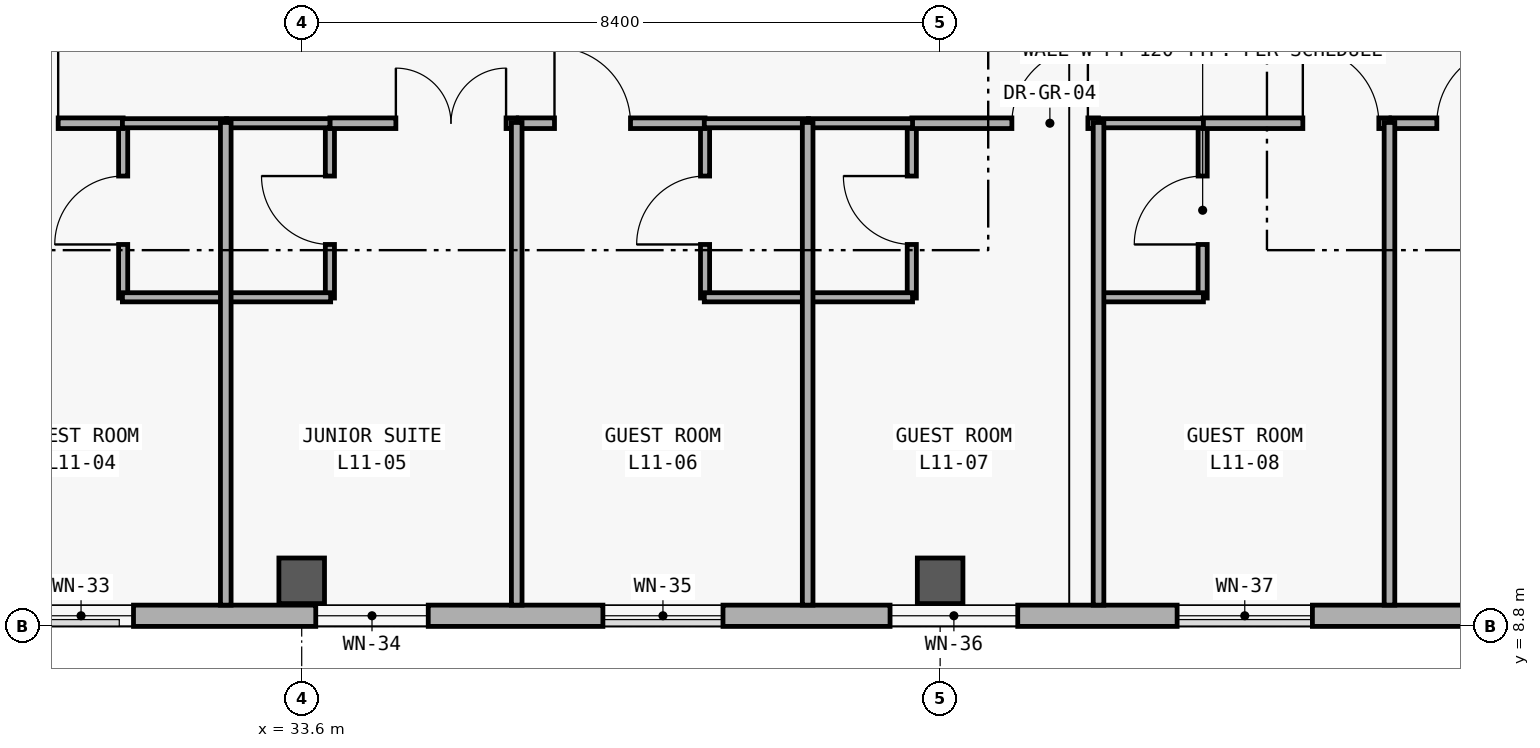
"""IFC4 building model, lengths in metres.
Left out: names, types, materials, properties, quantities, classifications, styles, units other than length and angle.
Written with IfcOpenShell. Run it as: python <this file> out.ifc"""

import sys

from ifc_helpers import new_model, si_unit, direction, frame, frame_2d, origin, origin_2d, place, context, subcontext, project, spatial, rectangle, extrude, element, fill, save


model = new_model("IFC4")
c1 = context("Model", 3, precision=1e-05, world=origin(), true_north=direction((0.0, 1.0)))
c2 = subcontext(c1, "Body", "Model", "MODEL_VIEW")
j1 = project(units=[si_unit("LENGTHUNIT", "METRE"), si_unit("PLANEANGLEUNIT", "RADIAN")], contexts=[c1])
p1 = place(None, origin())
s1 = spatial("IfcSite", under=j1, at=p1, CompositionType="ELEMENT")
p2 = place(p1, origin())
s2 = spatial("IfcBuilding", under=s1, at=p2, CompositionType="ELEMENT")
p3 = place(p2, frame((0.0, 0.0, 44.4)))
s3 = spatial("IfcBuildingStorey", under=s2, at=p3, CompositionType="ELEMENT", Elevation=44.4)
for number, where, z_axis, x_axis in (
    (1, (33.6, 9.4, 0.0), (0.0, 0.0, 1.0), (1.0, 0.0, 0.0)),
    (2, (42.0, 9.4, 0.0), (0.0, 0.0, 1.0), (1.0, 0.0, 0.0)),
):
    element("IfcColumn", number, at=place(p3, frame(where, z_axis=z_axis, x_axis=x_axis)), inside=s3, PredefinedType="COLUMN", context=c2, shape_type="SweptSolid", body=[
        extrude(rectangle(XDim=0.6, YDim=0.6, at=origin_2d()), origin(), (0.0, 0.0, 1.0), 4.2),
    ])
p4 = place(p3, frame((66.92, 8.94, 0.0), z_axis=(0.0, 0.0, 1.0), x_axis=(-1.0, 0.0, 0.0)))
e3 = element("IfcWall", 3, at=p4, inside=s3, PredefinedType="SOLIDWALL", context=c2, shape_type="SweptSolid", body=[
    extrude(rectangle(XDim=49.84, YDim=0.28, at=frame_2d((24.92, 0.0))), origin(), (0.0, 0.0, 1.0), 3.96),
])
p5 = place(p4, frame((6.82, 0.0, 0.85)))
e4 = element("IfcOpeningElement", 4, at=p5, cuts=e3, PredefinedType="OPENING", context=c2, shape_type="SweptSolid", body=[
    extrude(rectangle(XDim=1.5, YDim=1.75, at=frame_2d((0.75, 0.875))), frame((0.0, 0.15, 0.0), z_axis=(0.0, -1.0, 0.0), x_axis=(1.0, 0.0, 0.0)), (0.0, 0.0, 1.0), 0.3),
])
p6 = place(p4, frame((46.331, 0.0, 0.85)))
e5 = element("IfcOpeningElement", 5, at=p6, cuts=e3, PredefinedType="OPENING", context=c2, shape_type="SweptSolid", body=[
    extrude(rectangle(XDim=2.75, YDim=2.1, at=frame_2d((1.375, 1.05))), frame((0.0, 0.15, 0.0), z_axis=(0.0, -1.0, 0.0), x_axis=(1.0, 0.0, 0.0)), (0.0, 0.0, 1.0), 0.3),
])
p7 = place(p4, frame((43.288, 0.0, 0.85)))
e6 = element("IfcOpeningElement", 6, at=p7, cuts=e3, PredefinedType="OPENING", context=c2, shape_type="SweptSolid", body=[
    extrude(rectangle(XDim=1.18, YDim=1.5, at=frame_2d((0.59, 0.75))), frame((0.0, 0.15, 0.0), z_axis=(0.0, -1.0, 0.0), x_axis=(1.0, 0.0, 0.0)), (0.0, 0.0, 1.0), 0.3),
])
p8 = place(p4, frame((39.41, 0.0, 0.85)))
e7 = element("IfcOpeningElement", 7, at=p8, cuts=e3, PredefinedType="OPENING", context=c2, shape_type="SweptSolid", body=[
    extrude(rectangle(XDim=1.28, YDim=1.6, at=frame_2d((0.64, 0.8))), frame((0.0, 0.15, 0.0), z_axis=(0.0, -1.0, 0.0), x_axis=(1.0, 0.0, 0.0)), (0.0, 0.0, 1.0), 0.3),
])
p9 = place(p4, frame((35.533, 0.0, 0.85)))
e8 = element("IfcOpeningElement", 8, at=p9, cuts=e3, PredefinedType="OPENING", context=c2, shape_type="SweptSolid", body=[
    extrude(rectangle(XDim=1.38, YDim=1.7, at=frame_2d((0.69, 0.85))), frame((0.0, 0.15, 0.0), z_axis=(0.0, -1.0, 0.0), x_axis=(1.0, 0.0, 0.0)), (0.0, 0.0, 1.0), 0.3),
])
p10 = place(p4, frame((31.655, 0.0, 0.85)))
e9 = element("IfcOpeningElement", 9, at=p10, cuts=e3, PredefinedType="OPENING", context=c2, shape_type="SweptSolid", body=[
    extrude(rectangle(XDim=1.48, YDim=1.8, at=frame_2d((0.74, 0.9))), frame((0.0, 0.15, 0.0), z_axis=(0.0, -1.0, 0.0), x_axis=(1.0, 0.0, 0.0)), (0.0, 0.0, 1.0), 0.3),
])
p11 = place(p4, frame((27.777, 0.0, 0.85)))
e10 = element("IfcOpeningElement", 10, at=p11, cuts=e3, PredefinedType="OPENING", context=c2, shape_type="SweptSolid", body=[
    extrude(rectangle(XDim=1.58, YDim=1.85, at=frame_2d((0.79, 0.925))), frame((0.0, 0.15, 0.0), z_axis=(0.0, -1.0, 0.0), x_axis=(1.0, 0.0, 0.0)), (0.0, 0.0, 1.0), 0.3),
])
p12 = place(p4, frame((23.899, 0.0, 0.85)))
e11 = element("IfcOpeningElement", 11, at=p12, cuts=e3, PredefinedType="OPENING", context=c2, shape_type="SweptSolid", body=[
    extrude(rectangle(XDim=1.68, YDim=1.9, at=frame_2d((0.84, 0.95))), frame((0.0, 0.15, 0.0), z_axis=(0.0, -1.0, 0.0), x_axis=(1.0, 0.0, 0.0)), (0.0, 0.0, 1.0), 0.3),
])
p13 = place(p4, frame((20.022, 0.0, 0.85)))
e12 = element("IfcOpeningElement", 12, at=p13, cuts=e3, PredefinedType="OPENING", context=c2, shape_type="SweptSolid", body=[
    extrude(rectangle(XDim=1.78, YDim=1.95, at=frame_2d((0.89, 0.975))), frame((0.0, 0.15, 0.0), z_axis=(0.0, -1.0, 0.0), x_axis=(1.0, 0.0, 0.0)), (0.0, 0.0, 1.0), 0.3),
])
p14 = place(p4, frame((16.144, 0.0, 0.85)))
e13 = element("IfcOpeningElement", 13, at=p14, cuts=e3, PredefinedType="OPENING", context=c2, shape_type="SweptSolid", body=[
    extrude(rectangle(XDim=1.88, YDim=1.95, at=frame_2d((0.94, 0.975))), frame((0.0, 0.15, 0.0), z_axis=(0.0, -1.0, 0.0), x_axis=(1.0, 0.0, 0.0)), (0.0, 0.0, 1.0), 0.3),
])
p15 = place(p3, frame((31.251, 13.12, 0.0), z_axis=(0.0, 0.0, 1.0), x_axis=(0.0, 1.0, 0.0)))
e14 = element("IfcWall", 14, at=p15, inside=s3, PredefinedType="PARTITIONING", context=c2, shape_type="SweptSolid", body=[
    extrude(rectangle(XDim=2.31, YDim=0.12, at=frame_2d((1.155, 0.0))), origin(), (0.0, 0.0, 1.0), 3.06),
])
p16 = place(p15, frame((0.705, 0.0, 0.0)))
e15 = element("IfcOpeningElement", 15, at=p16, cuts=e14, PredefinedType="OPENING", context=c2, shape_type="SweptSolid", body=[
    extrude(rectangle(XDim=0.9, YDim=2.18, at=frame_2d((0.45, 1.09))), frame((0.0, 0.07, 0.0), z_axis=(0.0, -1.0, 0.0), x_axis=(1.0, 0.0, 0.0)), (0.0, 0.0, 1.0), 0.14),
])
p17 = place(p3, frame((33.971, 13.12, 0.0), z_axis=(0.0, 0.0, 1.0), x_axis=(0.0, 1.0, 0.0)))
e16 = element("IfcWall", 16, at=p17, inside=s3, PredefinedType="PARTITIONING", context=c2, shape_type="SweptSolid", body=[
    extrude(rectangle(XDim=2.31, YDim=0.12, at=frame_2d((1.155, 0.0))), origin(), (0.0, 0.0, 1.0), 3.06),
])
p18 = place(p17, frame((0.705, 0.0, 0.0)))
e17 = element("IfcOpeningElement", 17, at=p18, cuts=e16, PredefinedType="OPENING", context=c2, shape_type="SweptSolid", body=[
    extrude(rectangle(XDim=0.9, YDim=2.18, at=frame_2d((0.45, 1.09))), frame((0.0, 0.07, 0.0), z_axis=(0.0, -1.0, 0.0), x_axis=(1.0, 0.0, 0.0)), (0.0, 0.0, 1.0), 0.14),
])
p19 = place(p3, frame((38.907, 13.12, 0.0), z_axis=(0.0, 0.0, 1.0), x_axis=(0.0, 1.0, 0.0)))
e18 = element("IfcWall", 18, at=p19, inside=s3, PredefinedType="PARTITIONING", context=c2, shape_type="SweptSolid", body=[
    extrude(rectangle(XDim=2.31, YDim=0.12, at=frame_2d((1.155, 0.0))), origin(), (0.0, 0.0, 1.0), 3.06),
])
p20 = place(p19, frame((0.705, 0.0, 0.0)))
e19 = element("IfcOpeningElement", 19, at=p20, cuts=e18, PredefinedType="OPENING", context=c2, shape_type="SweptSolid", body=[
    extrude(rectangle(XDim=0.9, YDim=2.18, at=frame_2d((0.45, 1.09))), frame((0.0, 0.07, 0.0), z_axis=(0.0, -1.0, 0.0), x_axis=(1.0, 0.0, 0.0)), (0.0, 0.0, 1.0), 0.14),
])
p21 = place(p3, frame((41.627, 13.12, 0.0), z_axis=(0.0, 0.0, 1.0), x_axis=(0.0, 1.0, 0.0)))
e20 = element("IfcWall", 20, at=p21, inside=s3, PredefinedType="PARTITIONING", context=c2, shape_type="SweptSolid", body=[
    extrude(rectangle(XDim=2.31, YDim=0.12, at=frame_2d((1.155, 0.0))), origin(), (0.0, 0.0, 1.0), 3.06),
])
p22 = place(p21, frame((0.705, 0.0, 0.0)))
e21 = element("IfcOpeningElement", 21, at=p22, cuts=e20, PredefinedType="OPENING", context=c2, shape_type="SweptSolid", body=[
    extrude(rectangle(XDim=0.9, YDim=2.18, at=frame_2d((0.45, 1.09))), frame((0.0, 0.07, 0.0), z_axis=(0.0, -1.0, 0.0), x_axis=(1.0, 0.0, 0.0)), (0.0, 0.0, 1.0), 0.14),
])
p23 = place(p3, frame((45.454, 13.12, 0.0), z_axis=(0.0, 0.0, 1.0), x_axis=(0.0, 1.0, 0.0)))
e22 = element("IfcWall", 22, at=p23, inside=s3, PredefinedType="PARTITIONING", context=c2, shape_type="SweptSolid", body=[
    extrude(rectangle(XDim=2.31, YDim=0.12, at=frame_2d((1.155, 0.0))), origin(), (0.0, 0.0, 1.0), 3.06),
])
p24 = place(p23, frame((0.705, 0.0, 0.0)))
e23 = element("IfcOpeningElement", 23, at=p24, cuts=e22, PredefinedType="OPENING", context=c2, shape_type="SweptSolid", body=[
    extrude(rectangle(XDim=0.9, YDim=2.18, at=frame_2d((0.45, 1.09))), frame((0.0, 0.07, 0.0), z_axis=(0.0, -1.0, 0.0), x_axis=(1.0, 0.0, 0.0)), (0.0, 0.0, 1.0), 0.14),
])
p25 = place(p3, frame((28.793, 15.42, 0.0), z_axis=(0.0, 0.0, 1.0), x_axis=(1.0, 0.0, 0.0)))
e24 = element("IfcWall", 24, at=p25, inside=s3, PredefinedType="PARTITIONING", context=c2, shape_type="SweptSolid", body=[
    extrude(rectangle(XDim=2.458, YDim=0.14, at=frame_2d((1.229, 0.0))), origin(), (0.0, 0.0, 1.0), 3.06),
])
p26 = place(p25, frame((0.603, 0.0, 0.0)))
e25 = element("IfcOpeningElement", 25, at=p26, cuts=e24, PredefinedType="OPENING", context=c2, shape_type="SweptSolid", body=[
    extrude(rectangle(XDim=1.0, YDim=2.28, at=frame_2d((0.5, 1.14))), frame((0.0, 0.08, 0.0), z_axis=(0.0, -1.0, 0.0), x_axis=(1.0, 0.0, 0.0)), (0.0, 0.0, 1.0), 0.16),
])
p27 = place(p3, frame((33.971, 15.42, 0.0), z_axis=(0.0, 0.0, 1.0), x_axis=(1.0, 0.0, 0.0)))
e26 = element("IfcWall", 26, at=p27, inside=s3, PredefinedType="PARTITIONING", context=c2, shape_type="SweptSolid", body=[
    extrude(rectangle(XDim=2.458, YDim=0.14, at=frame_2d((1.229, 0.0))), origin(), (0.0, 0.0, 1.0), 3.06),
])
p28 = place(p27, frame((0.868, 0.0, 0.0)))
e27 = element("IfcOpeningElement", 27, at=p28, cuts=e26, PredefinedType="OPENING", context=c2, shape_type="SweptSolid", body=[
    extrude(rectangle(XDim=1.45, YDim=2.3, at=frame_2d((0.725, 1.15))), frame((0.0, 0.08, 0.0), z_axis=(0.0, -1.0, 0.0), x_axis=(1.0, 0.0, 0.0)), (0.0, 0.0, 1.0), 0.16),
])
p29 = place(p3, frame((36.449, 15.42, 0.0), z_axis=(0.0, 0.0, 1.0), x_axis=(1.0, 0.0, 0.0)))
e28 = element("IfcWall", 28, at=p29, inside=s3, PredefinedType="PARTITIONING", context=c2, shape_type="SweptSolid", body=[
    extrude(rectangle(XDim=2.458, YDim=0.14, at=frame_2d((1.229, 0.0))), origin(), (0.0, 0.0, 1.0), 3.06),
])
p30 = place(p29, frame((0.477, 0.0, 0.0)))
e29 = element("IfcOpeningElement", 29, at=p30, cuts=e28, PredefinedType="OPENING", context=c2, shape_type="SweptSolid", body=[
    extrude(rectangle(XDim=1.0, YDim=2.28, at=frame_2d((0.5, 1.14))), frame((0.0, 0.08, 0.0), z_axis=(0.0, -1.0, 0.0), x_axis=(1.0, 0.0, 0.0)), (0.0, 0.0, 1.0), 0.16),
])
p31 = place(p3, frame((41.627, 15.42, 0.0), z_axis=(0.0, 0.0, 1.0), x_axis=(1.0, 0.0, 0.0)))
e30 = element("IfcWall", 30, at=p31, inside=s3, PredefinedType="PARTITIONING", context=c2, shape_type="SweptSolid", body=[
    extrude(rectangle(XDim=2.457, YDim=0.14, at=frame_2d((1.229, 0.0))), origin(), (0.0, 0.0, 1.0), 3.06),
])
p32 = place(p31, frame((1.317, 0.0, 0.0)))
e31 = element("IfcOpeningElement", 31, at=p32, cuts=e30, PredefinedType="OPENING", context=c2, shape_type="SweptSolid", body=[
    extrude(rectangle(XDim=1.0, YDim=2.28, at=frame_2d((0.5, 1.14))), frame((0.0, 0.08, 0.0), z_axis=(0.0, -1.0, 0.0), x_axis=(1.0, 0.0, 0.0)), (0.0, 0.0, 1.0), 0.16),
])
p33 = place(p3, frame((45.454, 15.42, 0.0), z_axis=(0.0, 0.0, 1.0), x_axis=(1.0, 0.0, 0.0)))
e32 = element("IfcWall", 32, at=p33, inside=s3, PredefinedType="PARTITIONING", context=c2, shape_type="SweptSolid", body=[
    extrude(rectangle(XDim=2.458, YDim=0.14, at=frame_2d((1.229, 0.0))), origin(), (0.0, 0.0, 1.0), 3.06),
])
p34 = place(p33, frame((1.318, 0.0, 0.0)))
e33 = element("IfcOpeningElement", 33, at=p34, cuts=e32, PredefinedType="OPENING", context=c2, shape_type="SweptSolid", body=[
    extrude(rectangle(XDim=1.0, YDim=2.28, at=frame_2d((0.5, 1.14))), frame((0.0, 0.08, 0.0), z_axis=(0.0, -1.0, 0.0), x_axis=(1.0, 0.0, 0.0)), (0.0, 0.0, 1.0), 0.16),
])
p35 = place(p3, frame((47.932, 15.42, 0.0), z_axis=(0.0, 0.0, 1.0), x_axis=(1.0, 0.0, 0.0)))
e34 = element("IfcWall", 34, at=p35, inside=s3, PredefinedType="PARTITIONING", context=c2, shape_type="SweptSolid", body=[
    extrude(rectangle(XDim=2.458, YDim=0.14, at=frame_2d((1.229, 0.0))), origin(), (0.0, 0.0, 1.0), 3.06),
])
p36 = place(p35, frame((0.603, 0.0, 0.0)))
e35 = element("IfcOpeningElement", 35, at=p36, cuts=e34, PredefinedType="OPENING", context=c2, shape_type="SweptSolid", body=[
    extrude(rectangle(XDim=1.0, YDim=2.28, at=frame_2d((0.5, 1.14))), frame((0.0, 0.08, 0.0), z_axis=(0.0, -1.0, 0.0), x_axis=(1.0, 0.0, 0.0)), (0.0, 0.0, 1.0), 0.16),
])
for number, where, z_axis, x_axis in (
    (36, (31.241, 13.13, 0.0), (0.0, 0.0, 1.0), (1.0, 0.0, 0.0)),
    (37, (31.241, 15.42, 0.0), (0.0, 0.0, 1.0), (1.0, 0.0, 0.0)),
):
    element("IfcWall", number, at=place(p3, frame(where, z_axis=z_axis, x_axis=x_axis)), inside=s3, PredefinedType="PARTITIONING", context=c2, shape_type="SweptSolid", body=[
        extrude(rectangle(XDim=1.37, YDim=0.12, at=frame_2d((0.685, 0.0))), origin(), (0.0, 0.0, 1.0), 3.06),
    ])
p37 = place(p3, frame((32.611, 13.13, 0.0), z_axis=(0.0, 0.0, 1.0), x_axis=(1.0, 0.0, 0.0)))
e38 = element("IfcWall", 38, at=p37, inside=s3, PredefinedType="PARTITIONING", context=c2, shape_type="SweptSolid", body=[
    extrude(rectangle(XDim=1.37, YDim=0.12, at=frame_2d((0.685, 0.0))), origin(), (0.0, 0.0, 1.0), 3.06),
])
p38 = place(p3, frame((32.611, 15.42, 0.0), z_axis=(0.0, 0.0, 1.0), x_axis=(1.0, 0.0, 0.0)))
e39 = element("IfcWall", 39, at=p38, inside=s3, PredefinedType="PARTITIONING", context=c2, shape_type="SweptSolid", body=[
    extrude(rectangle(XDim=1.36, YDim=0.12, at=frame_2d((0.68, 0.0))), origin(), (0.0, 0.0, 1.0), 3.06),
])
for number, where, z_axis, x_axis in (
    (40, (38.897, 13.13, 0.0), (0.0, 0.0, 1.0), (1.0, 0.0, 0.0)),
    (41, (38.897, 15.42, 0.0), (0.0, 0.0, 1.0), (1.0, 0.0, 0.0)),
):
    element("IfcWall", number, at=place(p3, frame(where, z_axis=z_axis, x_axis=x_axis)), inside=s3, PredefinedType="PARTITIONING", context=c2, shape_type="SweptSolid", body=[
        extrude(rectangle(XDim=1.37, YDim=0.12, at=frame_2d((0.685, 0.0))), origin(), (0.0, 0.0, 1.0), 3.06),
    ])
for number, where, z_axis, x_axis in (
    (42, (40.267, 13.13, 0.0), (0.0, 0.0, 1.0), (1.0, 0.0, 0.0)),
    (43, (40.267, 15.42, 0.0), (0.0, 0.0, 1.0), (1.0, 0.0, 0.0)),
):
    element("IfcWall", number, at=place(p3, frame(where, z_axis=z_axis, x_axis=x_axis)), inside=s3, PredefinedType="PARTITIONING", context=c2, shape_type="SweptSolid", body=[
        extrude(rectangle(XDim=1.37, YDim=0.12, at=frame_2d((0.685, 0.0))), origin(), (0.0, 0.0, 1.0), 3.06),
    ])
for number, where, z_axis, x_axis in (
    (44, (44.094, 13.13, 0.0), (0.0, 0.0, 1.0), (1.0, 0.0, 0.0)),
    (45, (44.094, 15.42, 0.0), (0.0, 0.0, 1.0), (1.0, 0.0, 0.0)),
):
    element("IfcWall", number, at=place(p3, frame(where, z_axis=z_axis, x_axis=x_axis)), inside=s3, PredefinedType="PARTITIONING", context=c2, shape_type="SweptSolid", body=[
        extrude(rectangle(XDim=1.37, YDim=0.12, at=frame_2d((0.685, 0.0))), origin(), (0.0, 0.0, 1.0), 3.06),
    ])
for number, where, z_axis, x_axis in (
    (46, (32.601, 9.08, 0.0), (0.0, 0.0, 1.0), (0.0, 1.0, 0.0)),
    (47, (36.429, 9.08, 0.0), (0.0, 0.0, 1.0), (0.0, 1.0, 0.0)),
    (48, (40.257, 9.08, 0.0), (0.0, 0.0, 1.0), (0.0, 1.0, 0.0)),
    (49, (44.084, 9.08, 0.0), (0.0, 0.0, 1.0), (0.0, 1.0, 0.0)),
    (50, (47.912, 9.08, 0.0), (0.0, 0.0, 1.0), (0.0, 1.0, 0.0)),
):
    element("IfcWall", number, at=place(p3, frame(where, z_axis=z_axis, x_axis=x_axis)), inside=s3, PredefinedType="PARTITIONING", context=c2, shape_type="SweptSolid", body=[
        extrude(rectangle(XDim=6.35, YDim=0.14, at=frame_2d((3.175, 0.0))), origin(), (0.0, 0.0, 1.0), 3.06),
    ])
p39 = place(p9, origin())
e51 = element("IfcWindow", 51, at=p39, inside=s3, PartitioningType="SINGLE_PANEL", PredefinedType="WINDOW", context=c2, shape_type="SweptSolid", body=[
    extrude(rectangle(XDim=1.38, YDim=1.7, at=frame_2d((0.69, 0.85))), frame((0.0, 0.03, 0.0), z_axis=(0.0, -1.0, 0.0), x_axis=(1.0, 0.0, 0.0)), (0.0, 0.0, 1.0), 0.06),
])
fill(e8, e51)
p40 = place(p10, origin())
e52 = element("IfcWindow", 52, at=p40, inside=s3, PartitioningType="SINGLE_PANEL", PredefinedType="WINDOW", context=c2, shape_type="SweptSolid", body=[
    extrude(rectangle(XDim=1.48, YDim=1.8, at=frame_2d((0.74, 0.9))), frame((0.0, 0.03, 0.0), z_axis=(0.0, -1.0, 0.0), x_axis=(1.0, 0.0, 0.0)), (0.0, 0.0, 1.0), 0.06),
])
fill(e9, e52)
p41 = place(p11, origin())
e53 = element("IfcWindow", 53, at=p41, inside=s3, PartitioningType="SINGLE_PANEL", PredefinedType="WINDOW", context=c2, shape_type="SweptSolid", body=[
    extrude(rectangle(XDim=1.58, YDim=1.85, at=frame_2d((0.79, 0.925))), frame((0.0, 0.03, 0.0), z_axis=(0.0, -1.0, 0.0), x_axis=(1.0, 0.0, 0.0)), (0.0, 0.0, 1.0), 0.06),
])
fill(e10, e53)
p42 = place(p12, origin())
e54 = element("IfcWindow", 54, at=p42, inside=s3, PartitioningType="SINGLE_PANEL", PredefinedType="WINDOW", context=c2, shape_type="SweptSolid", body=[
    extrude(rectangle(XDim=1.68, YDim=1.9, at=frame_2d((0.84, 0.95))), frame((0.0, 0.03, 0.0), z_axis=(0.0, -1.0, 0.0), x_axis=(1.0, 0.0, 0.0)), (0.0, 0.0, 1.0), 0.06),
])
fill(e11, e54)
p43 = place(p13, origin())
e55 = element("IfcWindow", 55, at=p43, inside=s3, PartitioningType="SINGLE_PANEL", PredefinedType="WINDOW", context=c2, shape_type="SweptSolid", body=[
    extrude(rectangle(XDim=1.78, YDim=1.95, at=frame_2d((0.89, 0.975))), frame((0.0, 0.03, 0.0), z_axis=(0.0, -1.0, 0.0), x_axis=(1.0, 0.0, 0.0)), (0.0, 0.0, 1.0), 0.06),
])
fill(e12, e55)
p44 = place(p16, origin())
e56 = element("IfcDoor", 56, at=p44, inside=s3, OperationType="SINGLE_SWING_LEFT", PredefinedType="DOOR", context=c2, shape_type="SweptSolid", body=[
    extrude(rectangle(XDim=0.9, YDim=2.18, at=frame_2d((0.45, 1.09))), frame((0.0, 0.025, 0.0), z_axis=(0.0, -1.0, 0.0), x_axis=(1.0, 0.0, 0.0)), (0.0, 0.0, 1.0), 0.05),
])
fill(e15, e56)
p45 = place(p18, origin())
e57 = element("IfcDoor", 57, at=p45, inside=s3, OperationType="SINGLE_SWING_RIGHT", PredefinedType="DOOR", context=c2, shape_type="SweptSolid", body=[
    extrude(rectangle(XDim=0.9, YDim=2.18, at=frame_2d((0.45, 1.09))), frame((0.0, 0.025, 0.0), z_axis=(0.0, -1.0, 0.0), x_axis=(1.0, 0.0, 0.0)), (0.0, 0.0, 1.0), 0.05),
])
fill(e17, e57)
p46 = place(p20, origin())
e58 = element("IfcDoor", 58, at=p46, inside=s3, OperationType="SINGLE_SWING_LEFT", PredefinedType="DOOR", context=c2, shape_type="SweptSolid", body=[
    extrude(rectangle(XDim=0.9, YDim=2.18, at=frame_2d((0.45, 1.09))), frame((0.0, 0.025, 0.0), z_axis=(0.0, -1.0, 0.0), x_axis=(1.0, 0.0, 0.0)), (0.0, 0.0, 1.0), 0.05),
])
fill(e19, e58)
p47 = place(p22, origin())
e59 = element("IfcDoor", 59, at=p47, inside=s3, OperationType="SINGLE_SWING_RIGHT", PredefinedType="DOOR", context=c2, shape_type="SweptSolid", body=[
    extrude(rectangle(XDim=0.9, YDim=2.18, at=frame_2d((0.45, 1.09))), frame((0.0, 0.025, 0.0), z_axis=(0.0, -1.0, 0.0), x_axis=(1.0, 0.0, 0.0)), (0.0, 0.0, 1.0), 0.05),
])
fill(e21, e59)
p48 = place(p24, origin())
e60 = element("IfcDoor", 60, at=p48, inside=s3, OperationType="SINGLE_SWING_LEFT", PredefinedType="DOOR", context=c2, shape_type="SweptSolid", body=[
    extrude(rectangle(XDim=0.9, YDim=2.18, at=frame_2d((0.45, 1.09))), frame((0.0, 0.025, 0.0), z_axis=(0.0, -1.0, 0.0), x_axis=(1.0, 0.0, 0.0)), (0.0, 0.0, 1.0), 0.05),
])
fill(e23, e60)
p49 = place(p26, origin())
e61 = element("IfcDoor", 61, at=p49, inside=s3, OperationType="SINGLE_SWING_RIGHT", PredefinedType="DOOR", context=c2, shape_type="SweptSolid", body=[
    extrude(rectangle(XDim=1.0, YDim=2.28, at=frame_2d((0.5, 1.14))), frame((0.0, 0.025, 0.0), z_axis=(0.0, -1.0, 0.0), x_axis=(1.0, 0.0, 0.0)), (0.0, 0.0, 1.0), 0.05),
])
fill(e25, e61)
p50 = place(p28, origin())
e62 = element("IfcDoor", 62, at=p50, inside=s3, OperationType="DOUBLE_DOOR_SINGLE_SWING", PredefinedType="DOOR", context=c2, shape_type="SweptSolid", body=[
    extrude(rectangle(XDim=1.45, YDim=2.3, at=frame_2d((0.725, 1.15))), frame((0.0, 0.025, 0.0), z_axis=(0.0, -1.0, 0.0), x_axis=(1.0, 0.0, 0.0)), (0.0, 0.0, 1.0), 0.05),
])
fill(e27, e62)
p51 = place(p30, origin())
e63 = element("IfcDoor", 63, at=p51, inside=s3, OperationType="SINGLE_SWING_LEFT", PredefinedType="DOOR", context=c2, shape_type="SweptSolid", body=[
    extrude(rectangle(XDim=1.0, YDim=2.28, at=frame_2d((0.5, 1.14))), frame((0.0, 0.025, 0.0), z_axis=(0.0, -1.0, 0.0), x_axis=(1.0, 0.0, 0.0)), (0.0, 0.0, 1.0), 0.05),
])
fill(e29, e63)
p52 = place(p32, origin())
e64 = element("IfcDoor", 64, at=p52, inside=s3, OperationType="SINGLE_SWING_RIGHT", PredefinedType="DOOR", context=c2, shape_type="SweptSolid", body=[
    extrude(rectangle(XDim=1.0, YDim=2.28, at=frame_2d((0.5, 1.14))), frame((0.0, 0.025, 0.0), z_axis=(0.0, -1.0, 0.0), x_axis=(1.0, 0.0, 0.0)), (0.0, 0.0, 1.0), 0.05),
])
fill(e31, e64)
p53 = place(p34, origin())
e65 = element("IfcDoor", 65, at=p53, inside=s3, OperationType="SINGLE_SWING_LEFT", PredefinedType="DOOR", context=c2, shape_type="SweptSolid", body=[
    extrude(rectangle(XDim=1.0, YDim=2.28, at=frame_2d((0.5, 1.14))), frame((0.0, 0.025, 0.0), z_axis=(0.0, -1.0, 0.0), x_axis=(1.0, 0.0, 0.0)), (0.0, 0.0, 1.0), 0.05),
])
fill(e33, e65)
p54 = place(p36, origin())
e66 = element("IfcDoor", 66, at=p54, inside=s3, OperationType="SINGLE_SWING_RIGHT", PredefinedType="DOOR", context=c2, shape_type="SweptSolid", body=[
    extrude(rectangle(XDim=1.0, YDim=2.28, at=frame_2d((0.5, 1.14))), frame((0.0, 0.025, 0.0), z_axis=(0.0, -1.0, 0.0), x_axis=(1.0, 0.0, 0.0)), (0.0, 0.0, 1.0), 0.05),
])
fill(e35, e66)
save(model, sys.argv[1])
